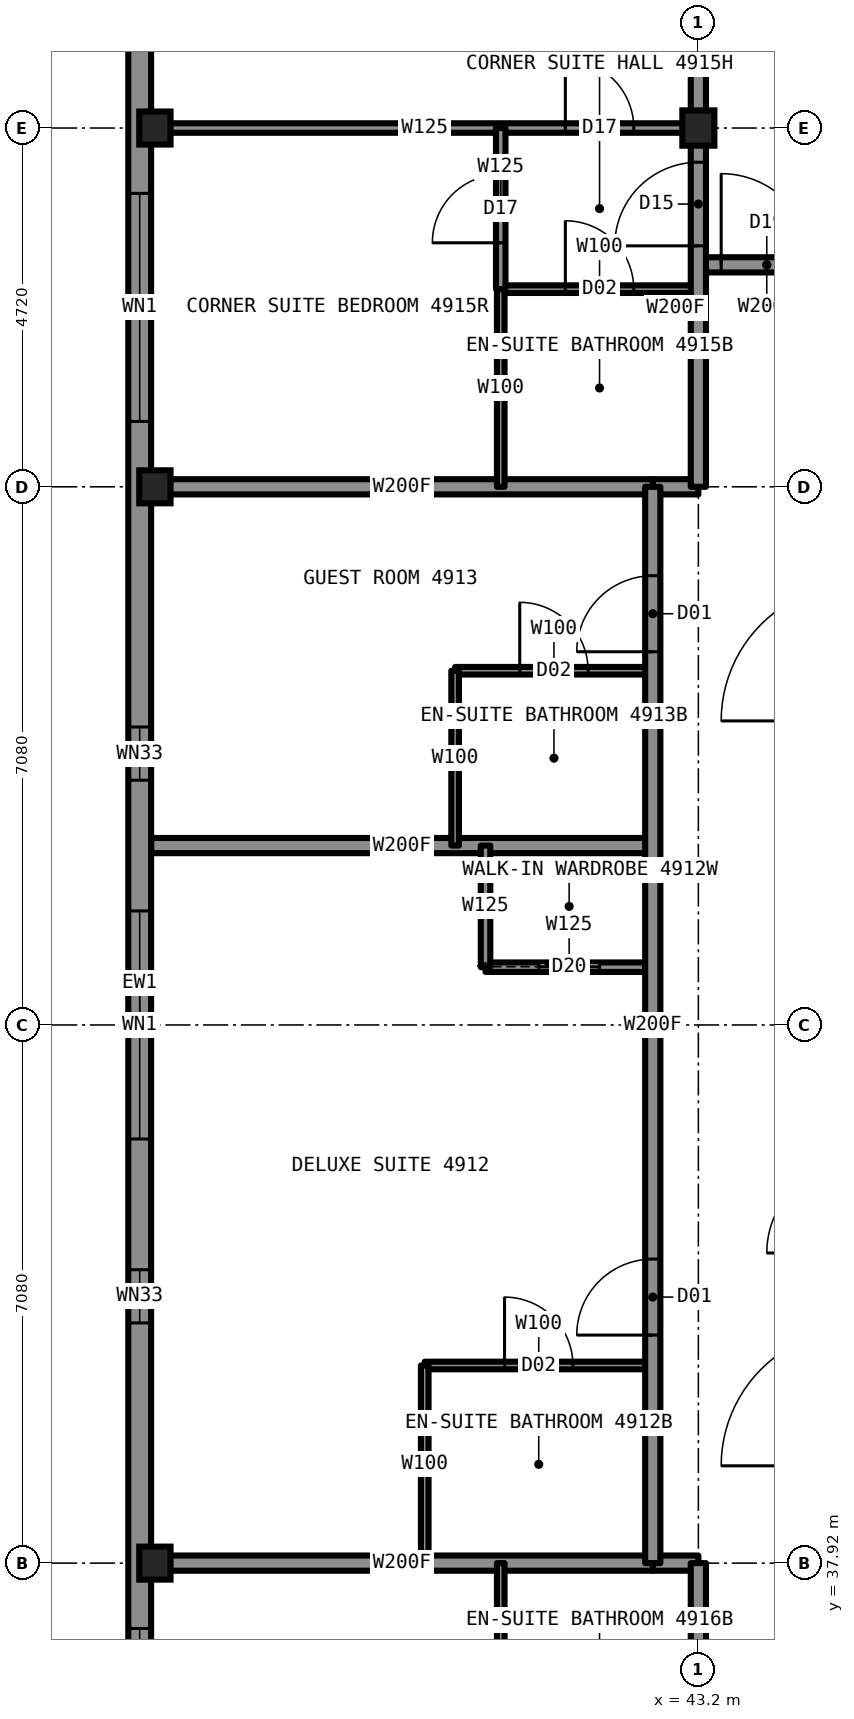
"""IFC4 building model, lengths in metres.
Left out: names, types, materials, properties, quantities, classifications, styles, units other than length and angle.
Written with IfcOpenShell. Run it as: python <this file> out.ifc"""

import sys

from ifc_helpers import new_model, si_unit, direction, frame, frame_2d, origin, origin_2d, place, context, subcontext, project, spatial, rectangle, i_section, extrude, element, fill, save


model = new_model("IFC4")
c1 = context("Model", 3, precision=1e-05, world=origin(), true_north=direction((0.0, 1.0)))
c2 = subcontext(c1, "Body", "Model", "MODEL_VIEW")
j1 = project(units=[si_unit("LENGTHUNIT", "METRE"), si_unit("PLANEANGLEUNIT", "RADIAN")], contexts=[c1])
p1 = place(None, origin())
s1 = spatial("IfcSite", under=j1, at=p1, CompositionType="ELEMENT")
p2 = place(p1, origin())
s2 = spatial("IfcBuilding", under=s1, at=p2, CompositionType="ELEMENT")
p3 = place(p2, frame((0.0, 0.0, 182.8)))
s3 = spatial("IfcBuildingStorey", under=s2, at=p3, CompositionType="ELEMENT", Elevation=182.8)
for number, where, z_axis, x_axis in (
    (1, (36.05, 37.92, 0.0), (0.0, 0.0, 1.0), (1.0, 0.0, 0.0)),
    (2, (36.05, 52.08, 0.0), (0.0, 0.0, 1.0), (1.0, 0.0, 0.0)),
    (3, (36.05, 56.8, 0.0), (0.0, 0.0, 1.0), (1.0, 0.0, 0.0)),
):
    element("IfcColumn", number, at=place(p3, frame(where, z_axis=z_axis, x_axis=x_axis)), inside=s3, PredefinedType="COLUMN", context=c2, shape_type="SweptSolid", body=[
        extrude(i_section(OverallWidth=0.411, OverallDepth=0.434, WebThickness=0.036, FlangeThickness=0.057, at=origin_2d()), origin(), (0.0, 0.0, 1.0), 3.5),
    ])
p4 = place(p3, frame((43.2, 56.8, 0.0), z_axis=(0.0, 0.0, 1.0), x_axis=(1.0, 0.0, 0.0)))
e4 = element("IfcColumn", 4, at=p4, inside=s3, PredefinedType="COLUMN", context=c2, shape_type="SweptSolid", body=[
    extrude(i_section(OverallWidth=0.422, OverallDepth=0.465, WebThickness=0.045, FlangeThickness=0.073, at=origin_2d()), origin(), (0.0, 0.0, 1.0), 3.5),
])
p5 = place(p3, frame((39.6, 40.52, 0.0), z_axis=(0.0, 0.0, 1.0), x_axis=(1.0, 0.0, 0.0)))
e5 = element("IfcWall", 5, at=p5, inside=s3, PredefinedType="PARTITIONING", context=c2, shape_type="SweptSolid", body=[
    extrude(rectangle(XDim=3.0, YDim=0.1, at=frame_2d((1.5, 0.0))), origin(), (0.0, 0.0, 1.0), 3.33),
])
p6 = place(p5, frame((1.05, 0.0, 0.0)))
e6 = element("IfcOpeningElement", 6, at=p6, cuts=e5, PredefinedType="OPENING", context=c2, shape_type="SweptSolid", body=[
    extrude(rectangle(XDim=0.9, YDim=2.1, at=frame_2d((0.45, 1.05))), frame((0.0, 0.06, 0.0), z_axis=(0.0, -1.0, 0.0), x_axis=(1.0, 0.0, 0.0)), (0.0, 0.0, 1.0), 0.12),
])
p7 = place(p3, frame((42.6, 37.92, 0.0), z_axis=(0.0, 0.0, 1.0), x_axis=(1.0, 0.0, 0.0)))
e7 = element("IfcWall", 7, at=p7, inside=s3, PredefinedType="PARTITIONING", context=c2, shape_type="SweptSolid", body=[
    extrude(rectangle(XDim=0.6, YDim=0.2, at=frame_2d((0.3, 0.0))), origin(), (0.0, 0.0, 1.0), 2.573),
])
p8 = place(p3, frame((36.0, 37.92, 0.0), z_axis=(0.0, 0.0, 1.0), x_axis=(1.0, 0.0, 0.0)))
e8 = element("IfcWall", 8, at=p8, inside=s3, PredefinedType="PARTITIONING", context=c2, shape_type="SweptSolid", body=[
    extrude(rectangle(XDim=6.6, YDim=0.2, at=frame_2d((3.3, 0.0))), origin(), (0.0, 0.0, 1.0), 2.573),
])
p9 = place(p3, frame((40.4, 45.76, 0.0), z_axis=(0.0, 0.0, 1.0), x_axis=(1.0, 0.0, 0.0)))
e9 = element("IfcWall", 9, at=p9, inside=s3, PredefinedType="PARTITIONING", context=c2, shape_type="SweptSolid", body=[
    extrude(rectangle(XDim=2.2, YDim=0.125, at=frame_2d((1.1, 0.0))), origin(), (0.0, 0.0, 1.0), 3.33),
])
p10 = place(p9, frame((0.7, 0.0, 0.0)))
e10 = element("IfcOpeningElement", 10, at=p10, cuts=e9, PredefinedType="OPENING", context=c2, shape_type="SweptSolid", body=[
    extrude(rectangle(XDim=0.8, YDim=2.1, at=frame_2d((0.4, 1.05))), frame((0.0, 0.073, 0.0), z_axis=(0.0, -1.0, 0.0), x_axis=(1.0, 0.0, 0.0)), (0.0, 0.0, 1.0), 0.145),
])
p11 = place(p3, frame((43.2, 55.0, 0.0), z_axis=(0.0, 0.0, 1.0), x_axis=(1.0, 0.0, 0.0)))
e11 = element("IfcWall", 11, at=p11, inside=s3, PredefinedType="PARTITIONING", context=c2, shape_type="SweptSolid", body=[
    extrude(rectangle(XDim=1.8, YDim=0.2, at=frame_2d((0.9, 0.0))), origin(), (0.0, 0.0, 1.0), 3.33),
])
p12 = place(p11, frame((0.3, 0.0, 0.0)))
e12 = element("IfcOpeningElement", 12, at=p12, cuts=e11, PredefinedType="OPENING", context=c2, shape_type="SweptSolid", body=[
    extrude(rectangle(XDim=1.2, YDim=2.2, at=frame_2d((0.6, 1.1))), frame((0.0, 0.11, 0.0), z_axis=(0.0, -1.0, 0.0), x_axis=(1.0, 0.0, 0.0)), (0.0, 0.0, 1.0), 0.22),
])
p13 = place(p3, frame((36.0, 56.8, 0.0), z_axis=(0.0, 0.0, 1.0), x_axis=(1.0, 0.0, 0.0)))
e13 = element("IfcWall", 13, at=p13, inside=s3, PredefinedType="PARTITIONING", context=c2, shape_type="SweptSolid", body=[
    extrude(rectangle(XDim=7.2, YDim=0.125, at=frame_2d((3.6, 0.0))), origin(), (0.0, 0.0, 1.0), 2.573),
])
p14 = place(p13, frame((5.45, 0.0, 0.0)))
e14 = element("IfcOpeningElement", 14, at=p14, cuts=e13, PredefinedType="OPENING", context=c2, shape_type="SweptSolid", body=[
    extrude(rectangle(XDim=0.9, YDim=2.2, at=frame_2d((0.45, 1.1))), frame((0.0, 0.073, 0.0), z_axis=(0.0, -1.0, 0.0), x_axis=(1.0, 0.0, 0.0)), (0.0, 0.0, 1.0), 0.145),
])
p15 = place(p3, frame((36.0, 47.36, 0.0), z_axis=(0.0, 0.0, 1.0), x_axis=(1.0, 0.0, 0.0)))
e15 = element("IfcWall", 15, at=p15, inside=s3, PredefinedType="PARTITIONING", context=c2, shape_type="SweptSolid", body=[
    extrude(rectangle(XDim=6.6, YDim=0.2, at=frame_2d((3.3, 0.0))), origin(), (0.0, 0.0, 1.0), 2.73),
])
p16 = place(p3, frame((40.0, 49.66, 0.0), z_axis=(0.0, 0.0, 1.0), x_axis=(1.0, 0.0, 0.0)))
e16 = element("IfcWall", 16, at=p16, inside=s3, PredefinedType="PARTITIONING", context=c2, shape_type="SweptSolid", body=[
    extrude(rectangle(XDim=2.6, YDim=0.1, at=frame_2d((1.3, 0.0))), origin(), (0.0, 0.0, 1.0), 2.73),
])
p17 = place(p16, frame((0.85, 0.0, 0.0)))
e17 = element("IfcOpeningElement", 17, at=p17, cuts=e16, PredefinedType="OPENING", context=c2, shape_type="SweptSolid", body=[
    extrude(rectangle(XDim=0.9, YDim=2.1, at=frame_2d((0.45, 1.05))), frame((0.0, 0.06, 0.0), z_axis=(0.0, -1.0, 0.0), x_axis=(1.0, 0.0, 0.0)), (0.0, 0.0, 1.0), 0.12),
])
p18 = place(p3, frame((42.6, 52.08, 0.0), z_axis=(0.0, 0.0, 1.0), x_axis=(1.0, 0.0, 0.0)))
e18 = element("IfcWall", 18, at=p18, inside=s3, PredefinedType="PARTITIONING", context=c2, shape_type="SweptSolid", body=[
    extrude(rectangle(XDim=0.6, YDim=0.2, at=frame_2d((0.3, 0.0))), origin(), (0.0, 0.0, 1.0), 2.573),
])
p19 = place(p3, frame((36.0, 52.08, 0.0), z_axis=(0.0, 0.0, 1.0), x_axis=(1.0, 0.0, 0.0)))
e19 = element("IfcWall", 19, at=p19, inside=s3, PredefinedType="PARTITIONING", context=c2, shape_type="SweptSolid", body=[
    extrude(rectangle(XDim=6.6, YDim=0.2, at=frame_2d((3.3, 0.0))), origin(), (0.0, 0.0, 1.0), 2.573),
])
p20 = place(p3, frame((40.6, 54.68, 0.0), z_axis=(0.0, 0.0, 1.0), x_axis=(1.0, 0.0, 0.0)))
e20 = element("IfcWall", 20, at=p20, inside=s3, PredefinedType="PARTITIONING", context=c2, shape_type="SweptSolid", body=[
    extrude(rectangle(XDim=2.6, YDim=0.1, at=frame_2d((1.3, 0.0))), origin(), (0.0, 0.0, 1.0), 3.33),
])
p21 = place(p20, frame((0.85, 0.0, 0.0)))
e21 = element("IfcOpeningElement", 21, at=p21, cuts=e20, PredefinedType="OPENING", context=c2, shape_type="SweptSolid", body=[
    extrude(rectangle(XDim=0.9, YDim=2.1, at=frame_2d((0.45, 1.05))), frame((0.0, 0.06, 0.0), z_axis=(0.0, -1.0, 0.0), x_axis=(1.0, 0.0, 0.0)), (0.0, 0.0, 1.0), 0.12),
])
p22 = place(p3, frame((43.2, 33.2, 0.0), z_axis=(0.0, 0.0, 1.0), x_axis=(0.0, 1.0, 0.0)))
e22 = element("IfcWall", 22, at=p22, inside=s3, PredefinedType="PARTITIONING", context=c2, shape_type="SweptSolid", body=[
    extrude(rectangle(XDim=4.72, YDim=0.2, at=frame_2d((2.36, 0.0))), origin(), (0.0, 0.0, 1.0), 3.33),
])
p23 = place(p22, frame((0.66, 0.0, 0.0)))
e23 = element("IfcOpeningElement", 23, at=p23, cuts=e22, PredefinedType="OPENING", context=c2, shape_type="SweptSolid", body=[
    extrude(rectangle(XDim=1.1, YDim=2.2, at=frame_2d((0.55, 1.1))), frame((0.0, 0.11, 0.0), z_axis=(0.0, -1.0, 0.0), x_axis=(1.0, 0.0, 0.0)), (0.0, 0.0, 1.0), 0.22),
])
p24 = place(p3, frame((43.2, 52.08, 0.0), z_axis=(0.0, 0.0, 1.0), x_axis=(0.0, 1.0, 0.0)))
e24 = element("IfcWall", 24, at=p24, inside=s3, PredefinedType="PARTITIONING", context=c2, shape_type="SweptSolid", body=[
    extrude(rectangle(XDim=4.7, YDim=0.2, at=frame_2d((2.35, 0.0))), origin(), (0.0, 0.0, 1.0), 3.33),
])
p25 = place(p24, frame((3.17, 0.0, 0.0)))
e25 = element("IfcOpeningElement", 25, at=p25, cuts=e24, PredefinedType="OPENING", context=c2, shape_type="SweptSolid", body=[
    extrude(rectangle(XDim=1.1, YDim=2.2, at=frame_2d((0.55, 1.1))), frame((0.0, 0.11, 0.0), z_axis=(0.0, -1.0, 0.0), x_axis=(1.0, 0.0, 0.0)), (0.0, 0.0, 1.0), 0.22),
])
p26 = place(p3, frame((42.6, 37.92, 0.0), z_axis=(0.0, 0.0, 1.0), x_axis=(0.0, 1.0, 0.0)))
e26 = element("IfcWall", 26, at=p26, inside=s3, PredefinedType="PARTITIONING", context=c2, shape_type="SweptSolid", body=[
    extrude(rectangle(XDim=14.16, YDim=0.2, at=frame_2d((7.08, 0.0))), origin(), (0.0, 0.0, 1.0), 3.33),
])
p27 = place(p26, frame((3.0, 0.0, 0.0)))
e27 = element("IfcOpeningElement", 27, at=p27, cuts=e26, PredefinedType="OPENING", context=c2, shape_type="SweptSolid", body=[
    extrude(rectangle(XDim=1.0, YDim=2.2, at=frame_2d((0.5, 1.1))), frame((0.0, 0.11, 0.0), z_axis=(0.0, -1.0, 0.0), x_axis=(1.0, 0.0, 0.0)), (0.0, 0.0, 1.0), 0.22),
])
p28 = place(p26, frame((11.99, 0.0, 0.0)))
e28 = element("IfcOpeningElement", 28, at=p28, cuts=e26, PredefinedType="OPENING", context=c2, shape_type="SweptSolid", body=[
    extrude(rectangle(XDim=1.0, YDim=2.2, at=frame_2d((0.5, 1.1))), frame((0.0, 0.11, 0.0), z_axis=(0.0, -1.0, 0.0), x_axis=(1.0, 0.0, 0.0)), (0.0, 0.0, 1.0), 0.22),
])
for number, where, z_axis, x_axis in (
    (29, (40.6, 35.32, 0.0), (0.0, 0.0, 1.0), (0.0, 1.0, 0.0)),
    (30, (40.6, 52.08, 0.0), (0.0, 0.0, 1.0), (0.0, 1.0, 0.0)),
):
    element("IfcWall", number, at=place(p3, frame(where, z_axis=z_axis, x_axis=x_axis)), inside=s3, PredefinedType="PARTITIONING", context=c2, shape_type="SweptSolid", body=[
        extrude(rectangle(XDim=2.6, YDim=0.1, at=frame_2d((1.3, 0.0))), origin(), (0.0, 0.0, 1.0), 3.33),
    ])
p29 = place(p3, frame((40.6, 54.68, 0.0), z_axis=(0.0, 0.0, 1.0), x_axis=(0.0, 1.0, 0.0)))
e31 = element("IfcWall", 31, at=p29, inside=s3, PredefinedType="PARTITIONING", context=c2, shape_type="SweptSolid", body=[
    extrude(rectangle(XDim=2.12, YDim=0.125, at=frame_2d((1.06, 0.0))), origin(), (0.0, 0.0, 1.0), 3.33),
])
p30 = place(p29, frame((0.61, 0.0, 0.0)))
e32 = element("IfcOpeningElement", 32, at=p30, cuts=e31, PredefinedType="OPENING", context=c2, shape_type="SweptSolid", body=[
    extrude(rectangle(XDim=0.9, YDim=2.2, at=frame_2d((0.45, 1.1))), frame((0.0, 0.073, 0.0), z_axis=(0.0, -1.0, 0.0), x_axis=(1.0, 0.0, 0.0)), (0.0, 0.0, 1.0), 0.145),
])
p31 = place(p3, frame((40.4, 45.76, 0.0), z_axis=(0.0, 0.0, 1.0), x_axis=(0.0, 1.0, 0.0)))
e33 = element("IfcWall", 33, at=p31, inside=s3, PredefinedType="PARTITIONING", context=c2, shape_type="SweptSolid", body=[
    extrude(rectangle(XDim=1.6, YDim=0.125, at=frame_2d((0.8, 0.0))), origin(), (0.0, 0.0, 1.0), 3.33),
])
p32 = place(p3, frame((40.0, 47.36, 0.0), z_axis=(0.0, 0.0, 1.0), x_axis=(0.0, 1.0, 0.0)))
e34 = element("IfcWall", 34, at=p32, inside=s3, PredefinedType="PARTITIONING", context=c2, shape_type="SweptSolid", body=[
    extrude(rectangle(XDim=2.3, YDim=0.1, at=frame_2d((1.15, 0.0))), origin(), (0.0, 0.0, 1.0), 3.33),
])
p33 = place(p3, frame((39.6, 37.92, 0.0), z_axis=(0.0, 0.0, 1.0), x_axis=(0.0, 1.0, 0.0)))
e35 = element("IfcWall", 35, at=p33, inside=s3, PredefinedType="PARTITIONING", context=c2, shape_type="SweptSolid", body=[
    extrude(rectangle(XDim=2.6, YDim=0.1, at=frame_2d((1.3, 0.0))), origin(), (0.0, 0.0, 1.0), 3.33),
])
p34 = place(p3, frame((35.85, 58.8, 0.0), z_axis=(0.0, 0.0, 1.0), x_axis=(0.0, -1.0, 0.0)))
e36 = element("IfcWall", 36, at=p34, inside=s3, PredefinedType="SOLIDWALL", context=c2, shape_type="SweptSolid", body=[
    extrude(rectangle(XDim=27.6, YDim=0.3, at=frame_2d((13.8, 0.0))), origin(), (0.0, 0.0, 1.0), 2.83),
])
p35 = place(p34, frame((2.86, 0.0, 0.3)))
e37 = element("IfcOpeningElement", 37, at=p35, cuts=e36, PredefinedType="OPENING", context=c2, shape_type="SweptSolid", body=[
    extrude(rectangle(XDim=3.0, YDim=2.0, at=frame_2d((1.5, 1.0))), frame((0.0, 0.16, 0.0), z_axis=(0.0, -1.0, 0.0), x_axis=(1.0, 0.0, 0.0)), (0.0, 0.0, 1.0), 0.32),
])
p36 = place(p34, frame((9.88, 0.0, 0.3)))
e38 = element("IfcOpeningElement", 38, at=p36, cuts=e36, PredefinedType="OPENING", context=c2, shape_type="SweptSolid", body=[
    extrude(rectangle(XDim=0.7, YDim=1.1, at=frame_2d((0.35, 0.55))), frame((0.0, 0.16, 0.0), z_axis=(0.0, -1.0, 0.0), x_axis=(1.0, 0.0, 0.0)), (0.0, 0.0, 1.0), 0.32),
])
p37 = place(p34, frame((12.3, 0.0, 0.3)))
e39 = element("IfcOpeningElement", 39, at=p37, cuts=e36, PredefinedType="OPENING", context=c2, shape_type="SweptSolid", body=[
    extrude(rectangle(XDim=3.0, YDim=2.0, at=frame_2d((1.5, 1.0))), frame((0.0, 0.16, 0.0), z_axis=(0.0, -1.0, 0.0), x_axis=(1.0, 0.0, 0.0)), (0.0, 0.0, 1.0), 0.32),
])
p38 = place(p34, frame((17.02, 0.0, 0.3)))
e40 = element("IfcOpeningElement", 40, at=p38, cuts=e36, PredefinedType="OPENING", context=c2, shape_type="SweptSolid", body=[
    extrude(rectangle(XDim=0.7, YDim=1.1, at=frame_2d((0.35, 0.55))), frame((0.0, 0.16, 0.0), z_axis=(0.0, -1.0, 0.0), x_axis=(1.0, 0.0, 0.0)), (0.0, 0.0, 1.0), 0.32),
])
p39 = place(p34, frame((21.74, 0.0, 0.3)))
e41 = element("IfcOpeningElement", 41, at=p39, cuts=e36, PredefinedType="OPENING", context=c2, shape_type="SweptSolid", body=[
    extrude(rectangle(XDim=3.0, YDim=2.0, at=frame_2d((1.5, 1.0))), frame((0.0, 0.16, 0.0), z_axis=(0.0, -1.0, 0.0), x_axis=(1.0, 0.0, 0.0)), (0.0, 0.0, 1.0), 0.32),
])
p40 = place(p3, frame((43.2, 56.78, 0.0), z_axis=(0.0, 0.0, 1.0), x_axis=(0.0, 1.0, 0.0)))
e42 = element("IfcWall", 42, at=p40, inside=s3, PredefinedType="PARTITIONING", context=c2, shape_type="SweptSolid", body=[
    extrude(rectangle(XDim=2.82, YDim=0.2, at=frame_2d((1.41, 0.0))), origin(), (0.0, 0.0, 1.0), 2.573),
])
p41 = place(p12, origin())
e43 = element("IfcDoor", 43, at=p41, inside=s3, OperationType="SINGLE_SWING_LEFT", PredefinedType="DOOR", context=c2, shape_type="SweptSolid", body=[
    extrude(rectangle(XDim=1.2, YDim=2.2, at=frame_2d((0.6, 1.1))), frame((0.0, 0.025, 0.0), z_axis=(0.0, -1.0, 0.0), x_axis=(1.0, 0.0, 0.0)), (0.0, 0.0, 1.0), 0.05),
])
fill(e12, e43)
p42 = place(p27, origin())
e44 = element("IfcDoor", 44, at=p42, inside=s3, OperationType="SINGLE_SWING_LEFT", PredefinedType="DOOR", context=c2, shape_type="SweptSolid", body=[
    extrude(rectangle(XDim=1.0, YDim=2.2, at=frame_2d((0.5, 1.1))), frame((0.0, 0.025, 0.0), z_axis=(0.0, -1.0, 0.0), x_axis=(1.0, 0.0, 0.0)), (0.0, 0.0, 1.0), 0.05),
])
fill(e27, e44)
p43 = place(p6, origin())
e45 = element("IfcDoor", 45, at=p43, inside=s3, OperationType="SINGLE_SWING_RIGHT", PredefinedType="DOOR", context=c2, shape_type="SweptSolid", body=[
    extrude(rectangle(XDim=0.9, YDim=2.1, at=frame_2d((0.45, 1.05))), frame((0.0, 0.025, 0.0), z_axis=(0.0, -1.0, 0.0), x_axis=(1.0, 0.0, 0.0)), (0.0, 0.0, 1.0), 0.05),
])
fill(e6, e45)
p44 = place(p10, origin())
e46 = element("IfcDoor", 46, at=p44, inside=s3, OperationType="SLIDING_TO_LEFT", PredefinedType="DOOR", context=c2, shape_type="SweptSolid", body=[
    extrude(rectangle(XDim=0.8, YDim=2.1, at=frame_2d((0.4, 1.05))), frame((0.0, 0.025, 0.0), z_axis=(0.0, -1.0, 0.0), x_axis=(1.0, 0.0, 0.0)), (0.0, 0.0, 1.0), 0.05),
])
fill(e10, e46)
p45 = place(p28, origin())
e47 = element("IfcDoor", 47, at=p45, inside=s3, OperationType="SINGLE_SWING_LEFT", PredefinedType="DOOR", context=c2, shape_type="SweptSolid", body=[
    extrude(rectangle(XDim=1.0, YDim=2.2, at=frame_2d((0.5, 1.1))), frame((0.0, 0.025, 0.0), z_axis=(0.0, -1.0, 0.0), x_axis=(1.0, 0.0, 0.0)), (0.0, 0.0, 1.0), 0.05),
])
fill(e28, e47)
p46 = place(p17, origin())
e48 = element("IfcDoor", 48, at=p46, inside=s3, OperationType="SINGLE_SWING_RIGHT", PredefinedType="DOOR", context=c2, shape_type="SweptSolid", body=[
    extrude(rectangle(XDim=0.9, YDim=2.1, at=frame_2d((0.45, 1.05))), frame((0.0, 0.025, 0.0), z_axis=(0.0, -1.0, 0.0), x_axis=(1.0, 0.0, 0.0)), (0.0, 0.0, 1.0), 0.05),
])
fill(e17, e48)
p47 = place(p14, origin())
e49 = element("IfcDoor", 49, at=p47, inside=s3, OperationType="SINGLE_SWING_LEFT", PredefinedType="DOOR", context=c2, shape_type="SweptSolid", body=[
    extrude(rectangle(XDim=0.9, YDim=2.2, at=frame_2d((0.45, 1.1))), frame((0.0, 0.025, 0.0), z_axis=(0.0, -1.0, 0.0), x_axis=(1.0, 0.0, 0.0)), (0.0, 0.0, 1.0), 0.05),
])
fill(e14, e49)
p48 = place(p21, origin())
e50 = element("IfcDoor", 50, at=p48, inside=s3, OperationType="SINGLE_SWING_RIGHT", PredefinedType="DOOR", context=c2, shape_type="SweptSolid", body=[
    extrude(rectangle(XDim=0.9, YDim=2.1, at=frame_2d((0.45, 1.05))), frame((0.0, 0.025, 0.0), z_axis=(0.0, -1.0, 0.0), x_axis=(1.0, 0.0, 0.0)), (0.0, 0.0, 1.0), 0.05),
])
fill(e21, e50)
p49 = place(p25, origin())
e51 = element("IfcDoor", 51, at=p49, inside=s3, OperationType="SINGLE_SWING_LEFT", PredefinedType="DOOR", context=c2, shape_type="SweptSolid", body=[
    extrude(rectangle(XDim=1.1, YDim=2.2, at=frame_2d((0.55, 1.1))), frame((0.0, 0.025, 0.0), z_axis=(0.0, -1.0, 0.0), x_axis=(1.0, 0.0, 0.0)), (0.0, 0.0, 1.0), 0.05),
])
fill(e25, e51)
p50 = place(p30, origin())
e52 = element("IfcDoor", 52, at=p50, inside=s3, OperationType="SINGLE_SWING_LEFT", PredefinedType="DOOR", context=c2, shape_type="SweptSolid", body=[
    extrude(rectangle(XDim=0.9, YDim=2.2, at=frame_2d((0.45, 1.1))), frame((0.0, 0.025, 0.0), z_axis=(0.0, -1.0, 0.0), x_axis=(1.0, 0.0, 0.0)), (0.0, 0.0, 1.0), 0.05),
])
fill(e32, e52)
p51 = place(p35, origin())
e53 = element("IfcWindow", 53, at=p51, inside=s3, PartitioningType="SINGLE_PANEL", PredefinedType="WINDOW", context=c2, shape_type="SweptSolid", body=[
    extrude(rectangle(XDim=3.0, YDim=2.0, at=frame_2d((1.5, 1.0))), frame((0.0, 0.13, 0.0), z_axis=(0.0, -1.0, 0.0), x_axis=(1.0, 0.0, 0.0)), (0.0, 0.0, 1.0), 0.06),
])
fill(e37, e53)
p52 = place(p36, origin())
e54 = element("IfcWindow", 54, at=p52, inside=s3, PartitioningType="SINGLE_PANEL", PredefinedType="WINDOW", context=c2, shape_type="SweptSolid", body=[
    extrude(rectangle(XDim=0.7, YDim=1.1, at=frame_2d((0.35, 0.55))), frame((0.0, 0.13, 0.0), z_axis=(0.0, -1.0, 0.0), x_axis=(1.0, 0.0, 0.0)), (0.0, 0.0, 1.0), 0.06),
])
fill(e38, e54)
p53 = place(p37, origin())
e55 = element("IfcWindow", 55, at=p53, inside=s3, PartitioningType="SINGLE_PANEL", PredefinedType="WINDOW", context=c2, shape_type="SweptSolid", body=[
    extrude(rectangle(XDim=3.0, YDim=2.0, at=frame_2d((1.5, 1.0))), frame((0.0, 0.13, 0.0), z_axis=(0.0, -1.0, 0.0), x_axis=(1.0, 0.0, 0.0)), (0.0, 0.0, 1.0), 0.06),
])
fill(e39, e55)
p54 = place(p38, origin())
e56 = element("IfcWindow", 56, at=p54, inside=s3, PartitioningType="SINGLE_PANEL", PredefinedType="WINDOW", context=c2, shape_type="SweptSolid", body=[
    extrude(rectangle(XDim=0.7, YDim=1.1, at=frame_2d((0.35, 0.55))), frame((0.0, 0.13, 0.0), z_axis=(0.0, -1.0, 0.0), x_axis=(1.0, 0.0, 0.0)), (0.0, 0.0, 1.0), 0.06),
])
fill(e40, e56)
p55 = place(p39, origin())
e57 = element("IfcWindow", 57, at=p55, inside=s3, PartitioningType="SINGLE_PANEL", PredefinedType="WINDOW", context=c2, shape_type="SweptSolid", body=[
    extrude(rectangle(XDim=3.0, YDim=2.0, at=frame_2d((1.5, 1.0))), frame((0.0, 0.13, 0.0), z_axis=(0.0, -1.0, 0.0), x_axis=(1.0, 0.0, 0.0)), (0.0, 0.0, 1.0), 0.06),
])
fill(e41, e57)
save(model, sys.argv[1])
